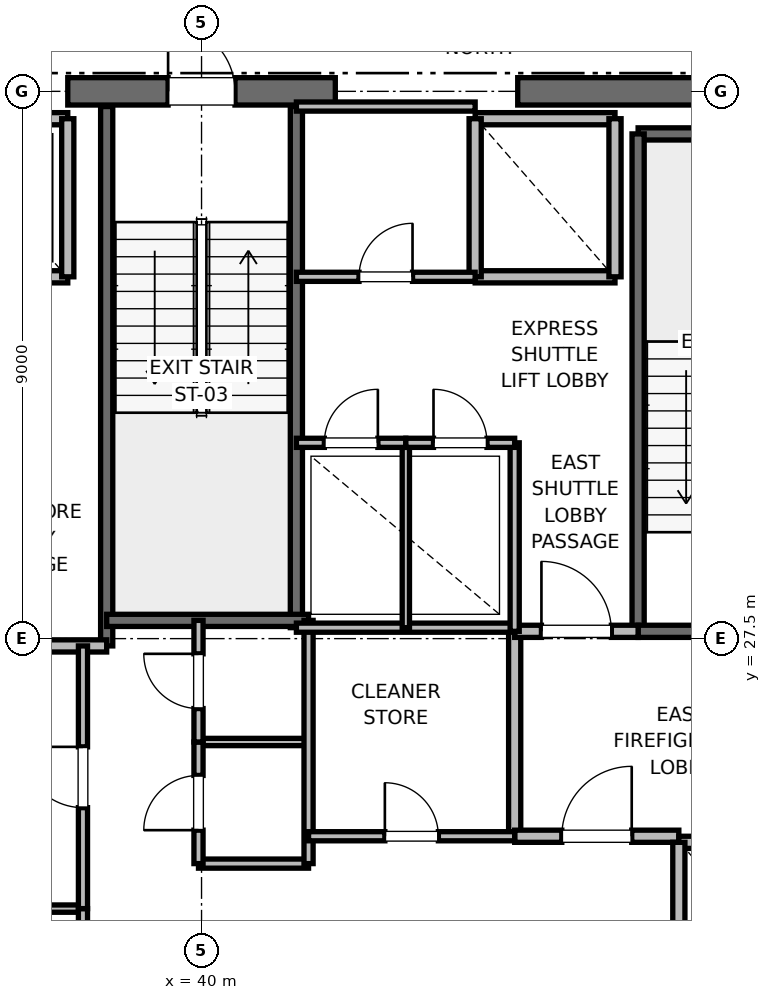
"""IFC4 building model, lengths in metres.
Left out: names, types, materials, properties, quantities, classifications, styles, units other than length and angle.
Written with IfcOpenShell. Run it as: python <this file> out.ifc"""

import sys

from ifc_helpers import new_model, si_unit, direction, frame, frame_2d, origin, place, context, subcontext, project, spatial, rectangle, extrude, element, fill, save


model = new_model("IFC4")
c1 = context("Model", 3, precision=1e-05, world=origin(), true_north=direction((0.0, 1.0)))
c2 = subcontext(c1, "Body", "Model", "MODEL_VIEW")
j1 = project(units=[si_unit("LENGTHUNIT", "METRE"), si_unit("PLANEANGLEUNIT", "RADIAN")], contexts=[c1])
p1 = place(None, origin())
s1 = spatial("IfcSite", under=j1, at=p1, CompositionType="ELEMENT")
p2 = place(p1, origin())
s2 = spatial("IfcBuilding", under=s1, at=p2, CompositionType="ELEMENT")
p3 = place(p2, frame((0.0, 0.0, 291.2)))
s3 = spatial("IfcBuildingStorey", under=s2, at=p3, CompositionType="ELEMENT", Elevation=291.2)
p4 = place(p3, frame((37.8, 36.5, 0.0), z_axis=(0.0, 0.0, 1.0), x_axis=(1.0, 0.0, 0.0)))
e1 = element("IfcWall", 1, at=p4, inside=s3, PredefinedType="SHEAR", context=c2, shape_type="SweptSolid", body=[
    extrude(rectangle(XDim=4.4, YDim=0.45, at=frame_2d((2.2, 0.0))), origin(), (0.0, 0.0, 1.0), 3.7),
])
p5 = place(p4, frame((1.65, 0.0, 0.0)))
e2 = element("IfcOpeningElement", 2, at=p5, cuts=e1, PredefinedType="OPENING", context=c2, shape_type="SweptSolid", body=[
    extrude(rectangle(XDim=1.1, YDim=2.15, at=frame_2d((0.55, 1.075))), frame((0.0, 0.225, 0.0), z_axis=(0.0, -1.0, 0.0), x_axis=(1.0, 0.0, 0.0)), (0.0, 0.0, 1.0), 0.45),
])
p6 = place(p3, frame((45.2, 36.5, 0.0), z_axis=(0.0, 0.0, 1.0), x_axis=(1.0, 0.0, 0.0)))
e3 = element("IfcWall", 3, at=p6, inside=s3, PredefinedType="SHEAR", context=c2, shape_type="SweptSolid", body=[
    extrude(rectangle(XDim=5.8, YDim=0.45, at=frame_2d((2.9, 0.0))), origin(), (0.0, 0.0, 1.0), 3.7),
])
p7 = place(p3, frame((47.18, 35.8, 0.0), z_axis=(0.0, 0.0, 1.0), x_axis=(1.0, 0.0, 0.0)))
e4 = element("IfcWall", 4, at=p7, inside=s3, PredefinedType="SOLIDWALL", context=c2, shape_type="SweptSolid", body=[
    extrude(rectangle(XDim=3.12, YDim=0.2, at=frame_2d((1.56, 0.0))), origin(), (0.0, 0.0, 1.0), 3.7),
])
p8 = place(p3, frame((47.18, 27.62, 0.0), z_axis=(0.0, 0.0, 1.0), x_axis=(0.0, 1.0, 0.0)))
e5 = element("IfcWall", 5, at=p8, inside=s3, PredefinedType="SOLIDWALL", context=c2, shape_type="SweptSolid", body=[
    extrude(rectangle(XDim=8.18, YDim=0.2, at=frame_2d((4.09, 0.0))), origin(), (0.0, 0.0, 1.0), 3.7),
])
p9 = place(p3, frame((47.18, 27.62, 0.0), z_axis=(0.0, 0.0, 1.0), x_axis=(1.0, 0.0, 0.0)))
e6 = element("IfcWall", 6, at=p9, inside=s3, PredefinedType="SOLIDWALL", context=c2, shape_type="SweptSolid", body=[
    extrude(rectangle(XDim=3.12, YDim=0.2, at=frame_2d((1.56, 0.0))), origin(), (0.0, 0.0, 1.0), 3.7),
])
p10 = place(p9, frame((1.01, 0.0, 0.0)))
e7 = element("IfcOpeningElement", 7, at=p10, cuts=e6, PredefinedType="OPENING", context=c2, shape_type="SweptSolid", body=[
    extrude(rectangle(XDim=1.1, YDim=2.15, at=frame_2d((0.55, 1.075))), frame((0.0, 0.1, 0.0), z_axis=(0.0, -1.0, 0.0), x_axis=(1.0, 0.0, 0.0)), (0.0, 0.0, 1.0), 0.2),
])
p11 = place(p3, frame((38.44, 27.38, 0.0), z_axis=(0.0, 0.0, 1.0), x_axis=(0.0, 1.0, 0.0)))
e8 = element("IfcWall", 8, at=p11, inside=s3, PredefinedType="SOLIDWALL", context=c2, shape_type="SweptSolid", body=[
    extrude(rectangle(XDim=8.87, YDim=0.2, at=frame_2d((4.435, 0.0))), origin(), (0.0, 0.0, 1.0), 3.7),
])
p12 = place(p3, frame((41.56, 27.68, 0.0), z_axis=(0.0, 0.0, 1.0), x_axis=(0.0, 1.0, 0.0)))
e9 = element("IfcWall", 9, at=p12, inside=s3, PredefinedType="SOLIDWALL", context=c2, shape_type="SweptSolid", body=[
    extrude(rectangle(XDim=8.57, YDim=0.2, at=frame_2d((4.285, 0.0))), origin(), (0.0, 0.0, 1.0), 3.7),
])
p13 = place(p3, frame((38.44, 27.8, 0.0), z_axis=(0.0, 0.0, 1.0), x_axis=(1.0, 0.0, 0.0)))
e10 = element("IfcWall", 10, at=p13, inside=s3, PredefinedType="SOLIDWALL", context=c2, shape_type="SweptSolid", body=[
    extrude(rectangle(XDim=3.32, YDim=0.2, at=frame_2d((1.66, 0.0))), origin(), (0.0, 0.0, 1.0), 3.7),
])
p14 = place(p3, frame((32.82, 27.38, 0.0), z_axis=(0.0, 0.0, 1.0), x_axis=(1.0, 0.0, 0.0)))
e11 = element("IfcWall", 11, at=p14, inside=s3, PredefinedType="PARTITIONING", context=c2, shape_type="SweptSolid", body=[
    extrude(rectangle(XDim=5.62, YDim=0.2, at=frame_2d((2.81, 0.0))), origin(), (0.0, 0.0, 1.0), 3.7),
])
p15 = place(p3, frame((45.15, 24.25, 0.0), z_axis=(0.0, 0.0, 1.0), x_axis=(0.0, 1.0, 0.0)))
e12 = element("IfcWall", 12, at=p15, inside=s3, PredefinedType="PARTITIONING", context=c2, shape_type="SweptSolid", body=[
    extrude(rectangle(XDim=3.37, YDim=0.2, at=frame_2d((1.685, 0.0))), origin(), (0.0, 0.0, 1.0), 3.7),
])
p16 = place(p3, frame((45.15, 24.25, 0.0), z_axis=(0.0, 0.0, 1.0), x_axis=(1.0, 0.0, 0.0)))
e13 = element("IfcWall", 13, at=p16, inside=s3, PredefinedType="PARTITIONING", context=c2, shape_type="SweptSolid", body=[
    extrude(rectangle(XDim=2.7, YDim=0.2, at=frame_2d((1.35, 0.0))), origin(), (0.0, 0.0, 1.0), 3.7),
])
p17 = place(p16, frame((0.775, 0.0, 0.0)))
e14 = element("IfcOpeningElement", 14, at=p17, cuts=e13, PredefinedType="OPENING", context=c2, shape_type="SweptSolid", body=[
    extrude(rectangle(XDim=1.15, YDim=2.2, at=frame_2d((0.575, 1.1))), frame((0.0, 0.1, 0.0), z_axis=(0.0, -1.0, 0.0), x_axis=(1.0, 0.0, 0.0)), (0.0, 0.0, 1.0), 0.2),
])
p18 = place(p3, frame((45.15, 27.62, 0.0), z_axis=(0.0, 0.0, 1.0), x_axis=(1.0, 0.0, 0.0)))
e15 = element("IfcWall", 15, at=p18, inside=s3, PredefinedType="PARTITIONING", context=c2, shape_type="SweptSolid", body=[
    extrude(rectangle(XDim=2.03, YDim=0.2, at=frame_2d((1.015, 0.0))), origin(), (0.0, 0.0, 1.0), 3.7),
])
p19 = place(p18, frame((0.44, 0.0, 0.0)))
e16 = element("IfcOpeningElement", 16, at=p19, cuts=e15, PredefinedType="OPENING", context=c2, shape_type="SweptSolid", body=[
    extrude(rectangle(XDim=1.15, YDim=2.2, at=frame_2d((0.575, 1.1))), frame((0.0, 0.1, 0.0), z_axis=(0.0, -1.0, 0.0), x_axis=(1.0, 0.0, 0.0)), (0.0, 0.0, 1.0), 0.2),
])
p20 = place(p3, frame((50.45, 24.15, 0.0), z_axis=(0.0, 0.0, 1.0), x_axis=(-1.0, 0.0, 0.0)))
e17 = element("IfcWall", 17, at=p20, inside=s3, PredefinedType="SOLIDWALL", context=c2, shape_type="SweptSolid", body=[
    extrude(rectangle(XDim=2.6, YDim=0.2, at=frame_2d((1.3, 0.0))), origin(), (0.0, 0.0, 1.0), 2.78),
])
p21 = place(p20, frame((0.75, 0.0, 0.0)))
e18 = element("IfcOpeningElement", 18, at=p21, cuts=e17, PredefinedType="OPENING", context=c2, shape_type="SweptSolid", body=[
    extrude(rectangle(XDim=1.1, YDim=2.2, at=frame_2d((0.55, 1.1))), frame((0.0, 0.1, 0.0), z_axis=(0.0, -1.0, 0.0), x_axis=(1.0, 0.0, 0.0)), (0.0, 0.0, 1.0), 0.2),
])
p22 = place(p3, frame((47.85, 24.15, 0.0), z_axis=(0.0, 0.0, 1.0), x_axis=(0.0, -1.0, 0.0)))
e19 = element("IfcWall", 19, at=p22, inside=s3, PredefinedType="SOLIDWALL", context=c2, shape_type="SweptSolid", body=[
    extrude(rectangle(XDim=3.0, YDim=0.2, at=frame_2d((1.5, 0.0))), origin(), (0.0, 0.0, 1.0), 3.7),
])
p23 = place(p3, frame((35.5, 33.45, 0.0), z_axis=(0.0, 0.0, 1.0), x_axis=(1.0, 0.0, 0.0)))
e20 = element("IfcWall", 20, at=p23, inside=s3, PredefinedType="SOLIDWALL", context=c2, shape_type="SweptSolid", body=[
    extrude(rectangle(XDim=2.3, YDim=0.2, at=frame_2d((1.15, 0.0))), origin(), (0.0, 0.0, 1.0), 3.7),
])
p24 = place(p23, frame((0.6, 0.0, 0.0)))
e21 = element("IfcOpeningElement", 21, at=p24, cuts=e20, PredefinedType="OPENING", context=c2, shape_type="SweptSolid", body=[
    extrude(rectangle(XDim=1.1, YDim=2.2, at=frame_2d((0.55, 1.1))), frame((0.0, 0.1, 0.0), z_axis=(0.0, -1.0, 0.0), x_axis=(1.0, 0.0, 0.0)), (0.0, 0.0, 1.0), 0.2),
])
p25 = place(p3, frame((37.8, 36.05, 0.0), z_axis=(0.0, 0.0, 1.0), x_axis=(-1.0, 0.0, 0.0)))
e22 = element("IfcWall", 22, at=p25, inside=s3, PredefinedType="SOLIDWALL", context=c2, shape_type="SweptSolid", body=[
    extrude(rectangle(XDim=2.3, YDim=0.2, at=frame_2d((1.15, 0.0))), origin(), (0.0, 0.0, 1.0), 2.78),
])
p26 = place(p3, frame((37.8, 33.45, 0.0), z_axis=(0.0, 0.0, 1.0), x_axis=(0.0, 1.0, 0.0)))
e23 = element("IfcWall", 23, at=p26, inside=s3, PredefinedType="SOLIDWALL", context=c2, shape_type="SweptSolid", body=[
    extrude(rectangle(XDim=2.6, YDim=0.2, at=frame_2d((1.3, 0.0))), origin(), (0.0, 0.0, 1.0), 2.78),
])
p27 = place(p3, frame((44.5, 33.45, 0.0), z_axis=(0.0, 0.0, 1.0), x_axis=(1.0, 0.0, 0.0)))
e24 = element("IfcWall", 24, at=p27, inside=s3, PredefinedType="SOLIDWALL", context=c2, shape_type="SweptSolid", body=[
    extrude(rectangle(XDim=2.3, YDim=0.2, at=frame_2d((1.15, 0.0))), origin(), (0.0, 0.0, 1.0), 3.7),
])
p28 = place(p3, frame((46.8, 36.05, 0.0), z_axis=(0.0, 0.0, 1.0), x_axis=(-1.0, 0.0, 0.0)))
e25 = element("IfcWall", 25, at=p28, inside=s3, PredefinedType="SOLIDWALL", context=c2, shape_type="SweptSolid", body=[
    extrude(rectangle(XDim=2.3, YDim=0.2, at=frame_2d((1.15, 0.0))), origin(), (0.0, 0.0, 1.0), 2.78),
])
p29 = place(p3, frame((44.5, 36.05, 0.0), z_axis=(0.0, 0.0, 1.0), x_axis=(0.0, -1.0, 0.0)))
e26 = element("IfcWall", 26, at=p29, inside=s3, PredefinedType="SOLIDWALL", context=c2, shape_type="SweptSolid", body=[
    extrude(rectangle(XDim=2.6, YDim=0.2, at=frame_2d((1.3, 0.0))), origin(), (0.0, 0.0, 1.0), 2.78),
])
p30 = place(p3, frame((46.8, 33.45, 0.0), z_axis=(0.0, 0.0, 1.0), x_axis=(0.0, 1.0, 0.0)))
e27 = element("IfcWall", 27, at=p30, inside=s3, PredefinedType="SOLIDWALL", context=c2, shape_type="SweptSolid", body=[
    extrude(rectangle(XDim=2.6, YDim=0.2, at=frame_2d((1.3, 0.0))), origin(), (0.0, 0.0, 1.0), 3.7),
])
p31 = place(p3, frame((39.95, 23.8, 0.0), z_axis=(0.0, 0.0, 1.0), x_axis=(1.0, 0.0, 0.0)))
e28 = element("IfcWall", 28, at=p31, inside=s3, PredefinedType="PARTITIONING", context=c2, shape_type="SweptSolid", body=[
    extrude(rectangle(XDim=1.81, YDim=0.15, at=frame_2d((0.905, 0.0))), origin(), (0.0, 0.0, 1.0), 2.85),
])
p32 = place(p3, frame((39.95, 25.8, 0.0), z_axis=(0.0, 0.0, 1.0), x_axis=(1.0, 0.0, 0.0)))
e29 = element("IfcWall", 29, at=p32, inside=s3, PredefinedType="PARTITIONING", context=c2, shape_type="SweptSolid", body=[
    extrude(rectangle(XDim=1.81, YDim=0.12, at=frame_2d((0.905, 0.0))), origin(), (0.0, 0.0, 1.0), 2.85),
])
p33 = place(p3, frame((41.76, 23.8, 0.0), z_axis=(0.0, 0.0, 1.0), x_axis=(0.0, 1.0, 0.0)))
e30 = element("IfcWall", 30, at=p33, inside=s3, PredefinedType="PARTITIONING", context=c2, shape_type="SweptSolid", body=[
    extrude(rectangle(XDim=4.0, YDim=0.15, at=frame_2d((2.0, 0.0))), origin(), (0.0, 0.0, 1.0), 2.85),
])
p34 = place(p3, frame((39.95, 23.8, 0.0), z_axis=(0.0, 0.0, 1.0), x_axis=(0.0, 1.0, 0.0)))
e31 = element("IfcWall", 31, at=p34, inside=s3, PredefinedType="PARTITIONING", context=c2, shape_type="SweptSolid", body=[
    extrude(rectangle(XDim=2.0, YDim=0.15, at=frame_2d((1.0, 0.0))), origin(), (0.0, 0.0, 1.0), 2.85),
])
p35 = place(p34, frame((0.55, 0.0, 0.0)))
e32 = element("IfcOpeningElement", 32, at=p35, cuts=e31, PredefinedType="OPENING", context=c2, shape_type="SweptSolid", body=[
    extrude(rectangle(XDim=0.9, YDim=2.1, at=frame_2d((0.45, 1.05))), frame((0.0, 0.075, 0.0), z_axis=(0.0, -1.0, 0.0), x_axis=(1.0, 0.0, 0.0)), (0.0, 0.0, 1.0), 0.15),
])
p36 = place(p3, frame((39.95, 25.8, 0.0), z_axis=(0.0, 0.0, 1.0), x_axis=(0.0, 1.0, 0.0)))
e33 = element("IfcWall", 33, at=p36, inside=s3, PredefinedType="PARTITIONING", context=c2, shape_type="SweptSolid", body=[
    extrude(rectangle(XDim=2.0, YDim=0.15, at=frame_2d((1.0, 0.0))), origin(), (0.0, 0.0, 1.0), 2.85),
])
p37 = place(p36, frame((0.55, 0.0, 0.0)))
e34 = element("IfcOpeningElement", 34, at=p37, cuts=e33, PredefinedType="OPENING", context=c2, shape_type="SweptSolid", body=[
    extrude(rectangle(XDim=0.9, YDim=2.1, at=frame_2d((0.45, 1.05))), frame((0.0, 0.075, 0.0), z_axis=(0.0, -1.0, 0.0), x_axis=(1.0, 0.0, 0.0)), (0.0, 0.0, 1.0), 0.15),
])
p38 = place(p3, frame((32.82, 23.06, 0.0), z_axis=(0.0, 0.0, 1.0), x_axis=(1.0, 0.0, 0.0)))
e35 = element("IfcWall", 35, at=p38, inside=s3, PredefinedType="PARTITIONING", context=c2, shape_type="SweptSolid", body=[
    extrude(rectangle(XDim=5.23, YDim=0.12, at=frame_2d((2.615, 0.0))), origin(), (0.0, 0.0, 1.0), 2.85),
])
p39 = place(p3, frame((38.05, 18.6, 0.0), z_axis=(0.0, 0.0, 1.0), x_axis=(0.0, 1.0, 0.0)))
e36 = element("IfcWall", 36, at=p39, inside=s3, PredefinedType="PARTITIONING", context=c2, shape_type="SweptSolid", body=[
    extrude(rectangle(XDim=4.46, YDim=0.15, at=frame_2d((2.23, 0.0))), origin(), (0.0, 0.0, 1.0), 2.78),
])
p40 = place(p39, frame((1.73, 0.0, 0.0)))
e37 = element("IfcOpeningElement", 37, at=p40, cuts=e36, PredefinedType="OPENING", context=c2, shape_type="SweptSolid", body=[
    extrude(rectangle(XDim=1.0, YDim=2.15, at=frame_2d((0.5, 1.075))), frame((0.0, 0.075, 0.0), z_axis=(0.0, -1.0, 0.0), x_axis=(1.0, 0.0, 0.0)), (0.0, 0.0, 1.0), 0.15),
])
p41 = place(p3, frame((38.05, 23.06, 0.0), z_axis=(0.0, 0.0, 1.0), x_axis=(0.0, 1.0, 0.0)))
e38 = element("IfcWall", 38, at=p41, inside=s3, PredefinedType="PARTITIONING", context=c2, shape_type="SweptSolid", body=[
    extrude(rectangle(XDim=4.32, YDim=0.15, at=frame_2d((2.16, 0.0))), origin(), (0.0, 0.0, 1.0), 2.85),
])
p42 = place(p41, frame((1.66, 0.0, 0.0)))
e39 = element("IfcOpeningElement", 39, at=p42, cuts=e38, PredefinedType="OPENING", context=c2, shape_type="SweptSolid", body=[
    extrude(rectangle(XDim=1.0, YDim=2.15, at=frame_2d((0.5, 1.075))), frame((0.0, 0.075, 0.0), z_axis=(0.0, -1.0, 0.0), x_axis=(1.0, 0.0, 0.0)), (0.0, 0.0, 1.0), 0.15),
])
p43 = place(p3, frame((41.56, 27.68, 0.0), z_axis=(0.0, 0.0, 1.0), x_axis=(1.0, 0.0, 0.0)))
e40 = element("IfcWall", 40, at=p43, inside=s3, PredefinedType="PARTITIONING", context=c2, shape_type="SweptSolid", body=[
    extrude(rectangle(XDim=3.59, YDim=0.15, at=frame_2d((1.795, 0.0))), origin(), (0.0, 0.0, 1.0), 2.85),
])
p44 = place(p3, frame((41.76, 24.25, 0.0), z_axis=(0.0, 0.0, 1.0), x_axis=(1.0, 0.0, 0.0)))
e41 = element("IfcWall", 41, at=p44, inside=s3, PredefinedType="PARTITIONING", context=c2, shape_type="SweptSolid", body=[
    extrude(rectangle(XDim=3.39, YDim=0.15, at=frame_2d((1.695, 0.0))), origin(), (0.0, 0.0, 1.0), 2.85),
])
p45 = place(p44, frame((1.255, 0.0, 0.0)))
e42 = element("IfcOpeningElement", 42, at=p45, cuts=e41, PredefinedType="OPENING", context=c2, shape_type="SweptSolid", body=[
    extrude(rectangle(XDim=0.88, YDim=2.1, at=frame_2d((0.44, 1.05))), frame((0.0, 0.075, 0.0), z_axis=(0.0, -1.0, 0.0), x_axis=(1.0, 0.0, 0.0)), (0.0, 0.0, 1.0), 0.15),
])
p46 = place(p3, frame((45.15, 27.62, 0.0), z_axis=(0.0, 0.0, 1.0), x_axis=(0.0, 1.0, 0.0)))
e43 = element("IfcWall", 43, at=p46, inside=s3, PredefinedType="PARTITIONING", context=c2, shape_type="SweptSolid", body=[
    extrude(rectangle(XDim=3.1, YDim=0.15, at=frame_2d((1.55, 0.0))), origin(), (0.0, 0.0, 1.0), 2.85),
])
p47 = place(p3, frame((43.36, 27.68, 0.0), z_axis=(0.0, 0.0, 1.0), x_axis=(0.0, 1.0, 0.0)))
e44 = element("IfcWall", 44, at=p47, inside=s3, PredefinedType="PARTITIONING", context=c2, shape_type="SweptSolid", body=[
    extrude(rectangle(XDim=3.04, YDim=0.12, at=frame_2d((1.52, 0.0))), origin(), (0.0, 0.0, 1.0), 2.85),
])
p48 = place(p3, frame((41.56, 30.72, 0.0), z_axis=(0.0, 0.0, 1.0), x_axis=(1.0, 0.0, 0.0)))
e45 = element("IfcWall", 45, at=p48, inside=s3, PredefinedType="PARTITIONING", context=c2, shape_type="SweptSolid", body=[
    extrude(rectangle(XDim=1.8, YDim=0.15, at=frame_2d((0.9, 0.0))), origin(), (0.0, 0.0, 1.0), 2.85),
])
p49 = place(p48, frame((0.46, 0.0, 0.0)))
e46 = element("IfcOpeningElement", 46, at=p49, cuts=e45, PredefinedType="OPENING", context=c2, shape_type="SweptSolid", body=[
    extrude(rectangle(XDim=0.88, YDim=2.1, at=frame_2d((0.44, 1.05))), frame((0.0, 0.075, 0.0), z_axis=(0.0, -1.0, 0.0), x_axis=(1.0, 0.0, 0.0)), (0.0, 0.0, 1.0), 0.15),
])
p50 = place(p3, frame((43.36, 30.72, 0.0), z_axis=(0.0, 0.0, 1.0), x_axis=(1.0, 0.0, 0.0)))
e47 = element("IfcWall", 47, at=p50, inside=s3, PredefinedType="PARTITIONING", context=c2, shape_type="SweptSolid", body=[
    extrude(rectangle(XDim=1.79, YDim=0.15, at=frame_2d((0.895, 0.0))), origin(), (0.0, 0.0, 1.0), 2.85),
])
p51 = place(p50, frame((0.455, 0.0, 0.0)))
e48 = element("IfcOpeningElement", 48, at=p51, cuts=e47, PredefinedType="OPENING", context=c2, shape_type="SweptSolid", body=[
    extrude(rectangle(XDim=0.88, YDim=2.1, at=frame_2d((0.44, 1.05))), frame((0.0, 0.075, 0.0), z_axis=(0.0, -1.0, 0.0), x_axis=(1.0, 0.0, 0.0)), (0.0, 0.0, 1.0), 0.15),
])
p52 = place(p3, frame((41.56, 36.25, 0.0), z_axis=(0.0, 0.0, 1.0), x_axis=(1.0, 0.0, 0.0)))
e49 = element("IfcWall", 49, at=p52, inside=s3, PredefinedType="PARTITIONING", context=c2, shape_type="SweptSolid", body=[
    extrude(rectangle(XDim=2.94, YDim=0.15, at=frame_2d((1.47, 0.0))), origin(), (0.0, 0.0, 1.0), 2.78),
])
p53 = place(p3, frame((41.56, 33.45, 0.0), z_axis=(0.0, 0.0, 1.0), x_axis=(1.0, 0.0, 0.0)))
e50 = element("IfcWall", 50, at=p53, inside=s3, PredefinedType="PARTITIONING", context=c2, shape_type="SweptSolid", body=[
    extrude(rectangle(XDim=2.94, YDim=0.15, at=frame_2d((1.47, 0.0))), origin(), (0.0, 0.0, 1.0), 2.85),
])
p54 = place(p53, frame((1.03, 0.0, 0.0)))
e51 = element("IfcOpeningElement", 51, at=p54, cuts=e50, PredefinedType="OPENING", context=c2, shape_type="SweptSolid", body=[
    extrude(rectangle(XDim=0.88, YDim=2.1, at=frame_2d((0.44, 1.05))), frame((0.0, 0.075, 0.0), z_axis=(0.0, -1.0, 0.0), x_axis=(1.0, 0.0, 0.0)), (0.0, 0.0, 1.0), 0.15),
])
p55 = place(p5, origin())
e52 = element("IfcDoor", 52, at=p55, inside=s3, OperationType="SINGLE_SWING_LEFT", PredefinedType="DOOR", context=c2, shape_type="SweptSolid", body=[
    extrude(rectangle(XDim=1.1, YDim=2.15, at=frame_2d((0.55, 1.075))), frame((0.0, 0.025, 0.0), z_axis=(0.0, -1.0, 0.0), x_axis=(1.0, 0.0, 0.0)), (0.0, 0.0, 1.0), 0.05),
])
fill(e2, e52)
p56 = place(p17, origin())
e53 = element("IfcDoor", 53, at=p56, inside=s3, OperationType="SINGLE_SWING_RIGHT", PredefinedType="DOOR", context=c2, shape_type="SweptSolid", body=[
    extrude(rectangle(XDim=1.15, YDim=2.2, at=frame_2d((0.575, 1.1))), frame((0.0, 0.025, 0.0), z_axis=(0.0, -1.0, 0.0), x_axis=(1.0, 0.0, 0.0)), (0.0, 0.0, 1.0), 0.05),
])
fill(e14, e53)
p57 = place(p19, origin())
e54 = element("IfcDoor", 54, at=p57, inside=s3, OperationType="SINGLE_SWING_LEFT", PredefinedType="DOOR", context=c2, shape_type="SweptSolid", body=[
    extrude(rectangle(XDim=1.15, YDim=2.2, at=frame_2d((0.575, 1.1))), frame((0.0, 0.025, 0.0), z_axis=(0.0, -1.0, 0.0), x_axis=(1.0, 0.0, 0.0)), (0.0, 0.0, 1.0), 0.05),
])
fill(e16, e54)
p58 = place(p35, origin())
e55 = element("IfcDoor", 55, at=p58, inside=s3, OperationType="SINGLE_SWING_LEFT", PredefinedType="DOOR", context=c2, shape_type="SweptSolid", body=[
    extrude(rectangle(XDim=0.9, YDim=2.1, at=frame_2d((0.45, 1.05))), frame((0.0, 0.025, 0.0), z_axis=(0.0, -1.0, 0.0), x_axis=(1.0, 0.0, 0.0)), (0.0, 0.0, 1.0), 0.05),
])
fill(e32, e55)
p59 = place(p37, origin())
e56 = element("IfcDoor", 56, at=p59, inside=s3, OperationType="SINGLE_SWING_RIGHT", PredefinedType="DOOR", context=c2, shape_type="SweptSolid", body=[
    extrude(rectangle(XDim=0.9, YDim=2.1, at=frame_2d((0.45, 1.05))), frame((0.0, 0.025, 0.0), z_axis=(0.0, -1.0, 0.0), x_axis=(1.0, 0.0, 0.0)), (0.0, 0.0, 1.0), 0.05),
])
fill(e34, e56)
p60 = place(p42, origin())
e57 = element("IfcDoor", 57, at=p60, inside=s3, OperationType="SINGLE_SWING_RIGHT", PredefinedType="DOOR", context=c2, shape_type="SweptSolid", body=[
    extrude(rectangle(XDim=1.0, YDim=2.15, at=frame_2d((0.5, 1.075))), frame((0.0, 0.025, 0.0), z_axis=(0.0, -1.0, 0.0), x_axis=(1.0, 0.0, 0.0)), (0.0, 0.0, 1.0), 0.05),
])
fill(e39, e57)
p61 = place(p45, origin())
e58 = element("IfcDoor", 58, at=p61, inside=s3, OperationType="SINGLE_SWING_LEFT", PredefinedType="DOOR", context=c2, shape_type="SweptSolid", body=[
    extrude(rectangle(XDim=0.88, YDim=2.1, at=frame_2d((0.44, 1.05))), frame((0.0, 0.025, 0.0), z_axis=(0.0, -1.0, 0.0), x_axis=(1.0, 0.0, 0.0)), (0.0, 0.0, 1.0), 0.05),
])
fill(e42, e58)
p62 = place(p49, origin())
e59 = element("IfcDoor", 59, at=p62, inside=s3, OperationType="SINGLE_SWING_RIGHT", PredefinedType="DOOR", context=c2, shape_type="SweptSolid", body=[
    extrude(rectangle(XDim=0.88, YDim=2.1, at=frame_2d((0.44, 1.05))), frame((0.0, 0.025, 0.0), z_axis=(0.0, -1.0, 0.0), x_axis=(1.0, 0.0, 0.0)), (0.0, 0.0, 1.0), 0.05),
])
fill(e46, e59)
p63 = place(p51, origin())
e60 = element("IfcDoor", 60, at=p63, inside=s3, OperationType="SINGLE_SWING_LEFT", PredefinedType="DOOR", context=c2, shape_type="SweptSolid", body=[
    extrude(rectangle(XDim=0.88, YDim=2.1, at=frame_2d((0.44, 1.05))), frame((0.0, 0.025, 0.0), z_axis=(0.0, -1.0, 0.0), x_axis=(1.0, 0.0, 0.0)), (0.0, 0.0, 1.0), 0.05),
])
fill(e48, e60)
p64 = place(p54, origin())
e61 = element("IfcDoor", 61, at=p64, inside=s3, OperationType="SINGLE_SWING_RIGHT", PredefinedType="DOOR", context=c2, shape_type="SweptSolid", body=[
    extrude(rectangle(XDim=0.88, YDim=2.1, at=frame_2d((0.44, 1.05))), frame((0.0, 0.025, 0.0), z_axis=(0.0, -1.0, 0.0), x_axis=(1.0, 0.0, 0.0)), (0.0, 0.0, 1.0), 0.05),
])
fill(e51, e61)
save(model, sys.argv[1])
